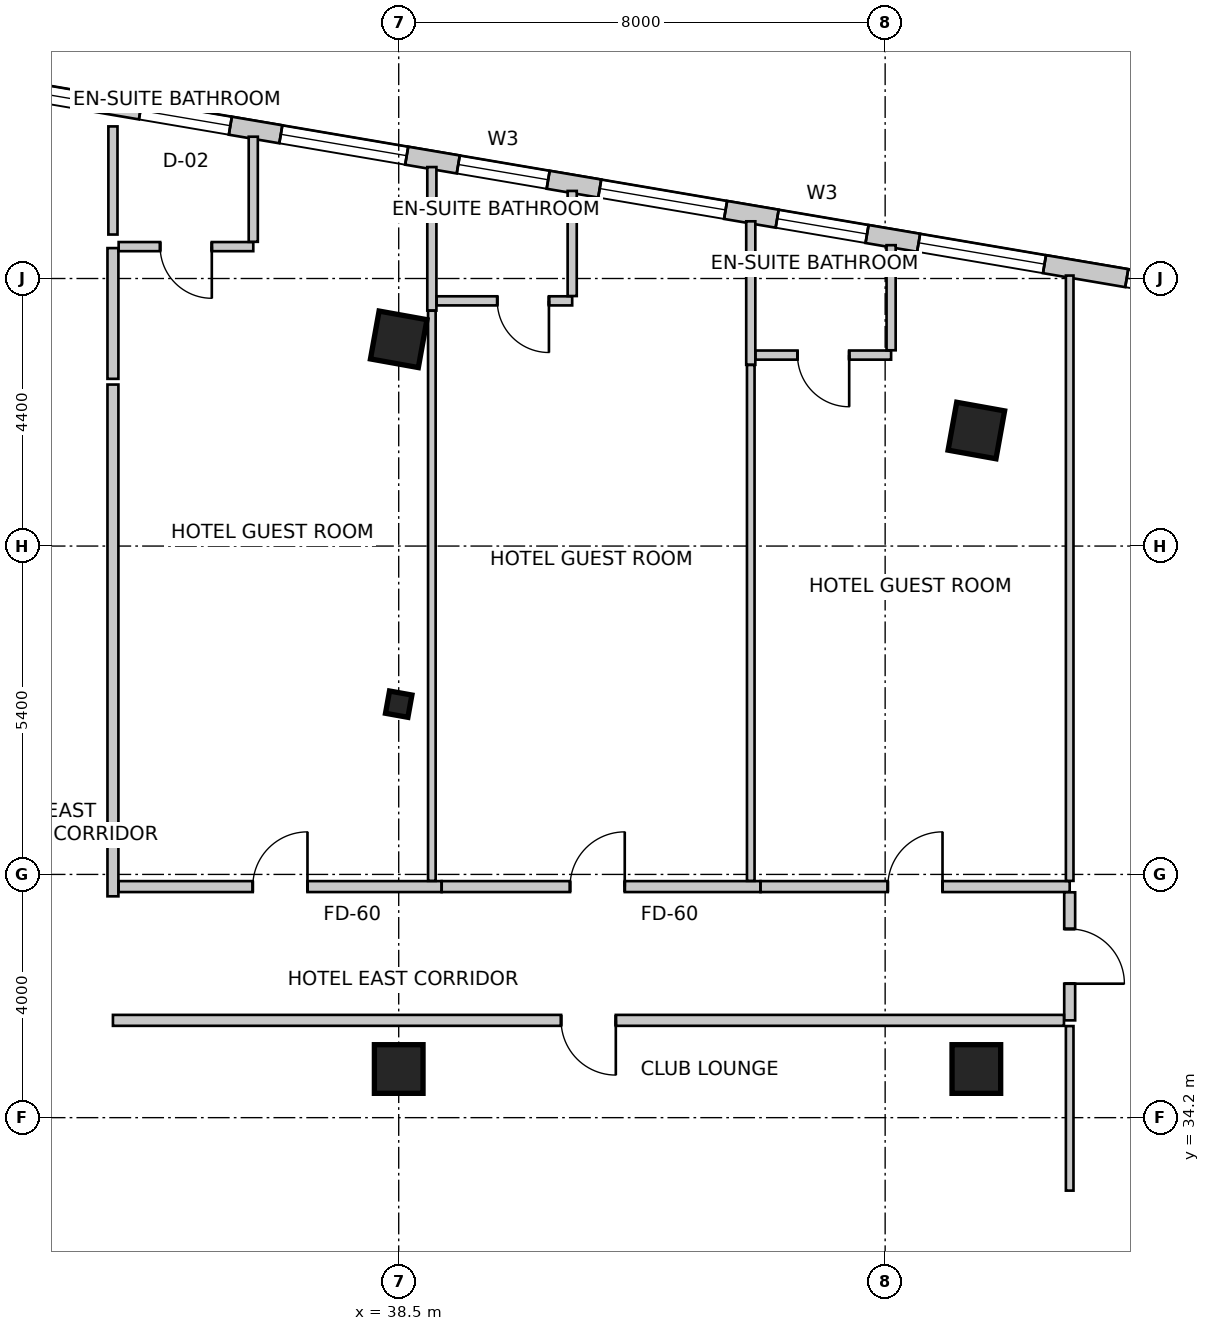
"""IFC4 building model, lengths in metres.
Left out: names, types, materials, properties, quantities, classifications, styles, units other than length and angle.
Written with IfcOpenShell. Run it as: python <this file> out.ifc"""

import sys

from ifc_helpers import new_model, si_unit, direction, frame, frame_2d, origin, origin_2d, place, context, subcontext, project, spatial, rectangle, i_section, extrude, source, transform, mapped, element, fill, save


model = new_model("IFC4")
c1 = context("Model", 3, precision=1e-05, world=origin(), true_north=direction((0.0, 1.0)))
c2 = subcontext(c1, "Body", "Model", "MODEL_VIEW")
j1 = project(units=[si_unit("LENGTHUNIT", "METRE"), si_unit("PLANEANGLEUNIT", "RADIAN")], contexts=[c1])
p1 = place(None, origin())
s1 = spatial("IfcSite", under=j1, at=p1, CompositionType="ELEMENT")
p2 = place(p1, origin())
s2 = spatial("IfcBuilding", under=s1, at=p2, CompositionType="ELEMENT")
p3 = place(p2, frame((0.0, 0.0, 114.2)))
s3 = spatial("IfcBuildingStorey", under=s2, at=p3, CompositionType="ELEMENT", Elevation=114.2)
m1 = source(origin(), c2, "Body", "SweptSolid", [
    extrude(rectangle(XDim=0.8, YDim=0.8, at=origin_2d()), origin(), (0.0, 0.0, 1.0), 3.6),
])
for number, where, z_axis, x_axis in (
    (1, (38.5, 47.0, 0.0), (0.0, 0.0, 1.0), (0.984, -0.177, 0.0)),
    (2, (48.0, 45.5, 0.0), (0.0, 0.0, 1.0), (0.984, -0.177, 0.0)),
    (3, (38.5, 35.0, 0.0), (0.0, 0.0, 1.0), (1.0, 0.0, 0.0)),
    (4, (48.0, 35.0, 0.0), (0.0, 0.0, 1.0), (1.0, 0.0, 0.0)),
):
    element("IfcColumn", number, at=place(p3, frame(where, z_axis=z_axis, x_axis=x_axis)), inside=s3, PredefinedType="COLUMN", context=c2, shape_type="MappedRepresentation", body=[
        mapped(m1, transform((0.0, 0.0, 0.0), scale=1.0)),
    ])
m2 = source(origin(), c2, "Body", "SweptSolid", [
    extrude(i_section(OverallWidth=0.374, OverallDepth=0.372, WebThickness=0.016, FlangeThickness=0.026, FilletRadius=0.015, at=origin_2d()), origin(), (0.0, 0.0, 1.0), 3.6),
])
p4 = place(p3, frame((38.5, 41.0, 0.0), z_axis=(0.0, 0.0, 1.0), x_axis=(0.984195607969, -0.17708474032, 0.0)))
e5 = element("IfcColumn", 5, at=p4, inside=s3, PredefinedType="COLUMN", context=c2, shape_type="MappedRepresentation", body=[
    mapped(m2, transform((0.0, 0.0, 0.0), scale=1.0)),
])
p5 = place(p3, frame((53.561, 47.48, 0.0), z_axis=(0.0, 0.0, 1.0), x_axis=(-0.985845173895, 0.167658262868, 0.0)))
e6 = element("IfcWall", 6, at=p5, inside=s3, PredefinedType="SOLIDWALL", context=c2, shape_type="SweptSolid", body=[
    extrude(rectangle(XDim=32.132, YDim=0.3, at=frame_2d((16.066, 0.0))), origin(), (0.0, 0.0, 1.0), 3.35),
])
m3 = source(origin(), c2, "Body", "SweptSolid", [
    extrude(rectangle(XDim=2.1, YDim=2.0, at=frame_2d((1.05, 1.0))), frame((0.0, 0.16, 0.0), z_axis=(0.0, -1.0, 0.0), x_axis=(1.0, 0.0, 0.0)), (0.0, 0.0, 1.0), 0.32),
])
p6 = place(p5, frame((1.032, 0.0, 0.85)))
e7 = element("IfcOpeningElement", 7, at=p6, cuts=e6, PredefinedType="OPENING", context=c2, shape_type="MappedRepresentation", body=[
    mapped(m3, transform((0.0, 0.0, 0.0), scale=1.0)),
])
p7 = place(p5, frame((4.504, 0.0, 0.85)))
e8 = element("IfcOpeningElement", 8, at=p7, cuts=e6, PredefinedType="OPENING", context=c2, shape_type="MappedRepresentation", body=[
    mapped(m3, transform((0.0, 0.0, 0.0), scale=1.0)),
])
m4 = source(origin(), c2, "Body", "SweptSolid", [
    extrude(rectangle(XDim=1.5, YDim=1.8, at=frame_2d((0.75, 0.9))), frame((0.0, 0.16, 0.0), z_axis=(0.0, -1.0, 0.0), x_axis=(1.0, 0.0, 0.0)), (0.0, 0.0, 1.0), 0.32),
])
p8 = place(p5, frame((7.464, 0.0, 0.85)))
e9 = element("IfcOpeningElement", 9, at=p8, cuts=e6, PredefinedType="OPENING", context=c2, shape_type="MappedRepresentation", body=[
    mapped(m4, transform((0.0, 0.0, 0.0), scale=1.0)),
])
p9 = place(p5, frame((9.824, 0.0, 0.85)))
e10 = element("IfcOpeningElement", 10, at=p9, cuts=e6, PredefinedType="OPENING", context=c2, shape_type="MappedRepresentation", body=[
    mapped(m3, transform((0.0, 0.0, 0.0), scale=1.0)),
])
p10 = place(p5, frame((12.784, 0.0, 0.85)))
e11 = element("IfcOpeningElement", 11, at=p10, cuts=e6, PredefinedType="OPENING", context=c2, shape_type="MappedRepresentation", body=[
    mapped(m4, transform((0.0, 0.0, 0.0), scale=1.0)),
])
p11 = place(p5, frame((15.144, 0.0, 0.85)))
e12 = element("IfcOpeningElement", 12, at=p11, cuts=e6, PredefinedType="OPENING", context=c2, shape_type="MappedRepresentation", body=[
    mapped(m3, transform((0.0, 0.0, 0.0), scale=1.0)),
])
p12 = place(p5, frame((18.086, 0.0, 0.85)))
e13 = element("IfcOpeningElement", 13, at=p12, cuts=e6, PredefinedType="OPENING", context=c2, shape_type="MappedRepresentation", body=[
    mapped(m4, transform((0.0, 0.0, 0.0), scale=1.0)),
])
p13 = place(p5, frame((20.459, 0.0, 0.85)))
e14 = element("IfcOpeningElement", 14, at=p13, cuts=e6, PredefinedType="OPENING", context=c2, shape_type="MappedRepresentation", body=[
    mapped(m3, transform((0.0, 0.0, 0.0), scale=1.0)),
])
p14 = place(p5, frame((25.55, 0.0, 0.85)))
e15 = element("IfcOpeningElement", 15, at=p14, cuts=e6, PredefinedType="OPENING", context=c2, shape_type="MappedRepresentation", body=[
    mapped(m3, transform((0.0, 0.0, 0.0), scale=1.0)),
])
m5 = source(origin(), c2, "Body", "SweptSolid", [
    extrude(rectangle(XDim=0.9, YDim=1.6, at=frame_2d((0.45, 0.8))), frame((0.0, 0.16, 0.0), z_axis=(0.0, -1.0, 0.0), x_axis=(1.0, 0.0, 0.0)), (0.0, 0.0, 1.0), 0.32),
])
p15 = place(p5, frame((30.65, 0.0, 0.85)))
e16 = element("IfcOpeningElement", 16, at=p15, cuts=e6, PredefinedType="OPENING", context=c2, shape_type="MappedRepresentation", body=[
    mapped(m5, transform((0.0, 0.0, 0.0), scale=1.0)),
])
p16 = place(p3, frame((33.8, 48.5, 0.0), z_axis=(0.0, 0.0, 1.0), x_axis=(0.0, -1.0, 0.0)))
e17 = element("IfcWall", 17, at=p16, inside=s3, PredefinedType="PARTITIONING", context=c2, shape_type="SweptSolid", body=[
    extrude(rectangle(XDim=2.15, YDim=0.18, at=frame_2d((1.075, 0.0))), origin(), (0.0, 0.0, 1.0), 2.492),
])
p17 = place(p3, frame((33.8, 46.256, 0.0), z_axis=(0.0, 0.0, 1.0), x_axis=(0.0, -1.0, 0.0)))
e18 = element("IfcWall", 18, at=p17, inside=s3, PredefinedType="PARTITIONING", context=c2, shape_type="SweptSolid", body=[
    extrude(rectangle(XDim=8.416, YDim=0.18, at=frame_2d((4.208, 0.0))), origin(), (0.0, 0.0, 1.0), 2.788),
])
p18 = place(p3, frame((33.894, 38.0, 0.0), z_axis=(0.0, 0.0, 1.0), x_axis=(1.0, 0.0, 0.0)))
e19 = element("IfcWall", 19, at=p18, inside=s3, PredefinedType="PARTITIONING", context=c2, shape_type="SweptSolid", body=[
    extrude(rectangle(XDim=5.311, YDim=0.18, at=frame_2d((2.656, 0.0))), origin(), (0.0, 0.0, 1.0), 2.803),
])
m6 = source(origin(), c2, "Body", "SweptSolid", [
    extrude(rectangle(XDim=0.9, YDim=2.15, at=frame_2d((0.45, 1.075))), frame((0.0, 0.1, 0.0), z_axis=(0.0, -1.0, 0.0), x_axis=(1.0, 0.0, 0.0)), (0.0, 0.0, 1.0), 0.2),
])
p19 = place(p18, frame((2.206, 0.0, 0.0)))
e20 = element("IfcOpeningElement", 20, at=p19, cuts=e19, PredefinedType="OPENING", context=c2, shape_type="MappedRepresentation", body=[
    mapped(m6, transform((0.0, 0.0, 0.0), scale=1.0)),
])
p20 = place(p3, frame((39.207, 38.0, 0.0), z_axis=(0.0, 0.0, 1.0), x_axis=(1.0, 0.0, 0.0)))
e21 = element("IfcWall", 21, at=p20, inside=s3, PredefinedType="PARTITIONING", context=c2, shape_type="SweptSolid", body=[
    extrude(rectangle(XDim=5.243, YDim=0.18, at=frame_2d((2.622, 0.0))), origin(), (0.0, 0.0, 1.0), 2.788),
])
p21 = place(p20, frame((2.111, 0.0, 0.0)))
e22 = element("IfcOpeningElement", 22, at=p21, cuts=e21, PredefinedType="OPENING", context=c2, shape_type="MappedRepresentation", body=[
    mapped(m6, transform((0.0, 0.0, 0.0), scale=1.0)),
])
p22 = place(p3, frame((44.452, 38.0, 0.0), z_axis=(0.0, 0.0, 1.0), x_axis=(1.0, 0.0, 0.0)))
e23 = element("IfcWall", 23, at=p22, inside=s3, PredefinedType="PARTITIONING", context=c2, shape_type="SweptSolid", body=[
    extrude(rectangle(XDim=5.083, YDim=0.18, at=frame_2d((2.542, 0.0))), origin(), (0.0, 0.0, 1.0), 2.803),
])
p23 = place(p22, frame((2.092, 0.0, 0.0)))
e24 = element("IfcOpeningElement", 24, at=p23, cuts=e23, PredefinedType="OPENING", context=c2, shape_type="MappedRepresentation", body=[
    mapped(m6, transform((0.0, 0.0, 0.0), scale=1.0)),
])
p24 = place(p3, frame((49.535, 37.906, 0.0), z_axis=(0.0, 0.0, 1.0), x_axis=(0.0, -1.0, 0.0)))
e25 = element("IfcWall", 25, at=p24, inside=s3, PredefinedType="PARTITIONING", context=c2, shape_type="SweptSolid", body=[
    extrude(rectangle(XDim=2.106, YDim=0.18, at=frame_2d((1.053, 0.0))), origin(), (0.0, 0.0, 1.0), 3.35),
])
p25 = place(p24, frame((0.603, 0.0, 0.0)))
e26 = element("IfcOpeningElement", 26, at=p25, cuts=e25, PredefinedType="OPENING", context=c2, shape_type="MappedRepresentation", body=[
    mapped(m6, transform((0.0, 0.0, 0.0), scale=1.0)),
])
p26 = place(p3, frame((49.441, 35.8, 0.0), z_axis=(0.0, 0.0, 1.0), x_axis=(-1.0, 0.0, 0.0)))
e27 = element("IfcWall", 27, at=p26, inside=s3, PredefinedType="PARTITIONING", context=c2, shape_type="SweptSolid", body=[
    extrude(rectangle(XDim=15.641, YDim=0.18, at=frame_2d((7.82, 0.0))), origin(), (0.0, 0.0, 1.0), 2.788),
])
p27 = place(p26, frame((7.371, 0.0, 0.0)))
e28 = element("IfcOpeningElement", 28, at=p27, cuts=e27, PredefinedType="OPENING", context=c2, shape_type="MappedRepresentation", body=[
    mapped(m6, transform((0.0, 0.0, 0.0), scale=1.0)),
])
p28 = place(p3, frame((36.108, 48.524, 0.0), z_axis=(0.0, 0.0, 1.0), x_axis=(-1.0, 0.0, 0.0)))
e29 = element("IfcWall", 29, at=p28, inside=s3, PredefinedType="PARTITIONING", context=c2, shape_type="SweptSolid", body=[
    extrude(rectangle(XDim=2.214, YDim=0.15, at=frame_2d((1.107, 0.0))), origin(), (0.0, 0.0, 1.0), 3.35),
])
m7 = source(origin(), c2, "Body", "SweptSolid", [
    extrude(rectangle(XDim=0.85, YDim=2.15, at=frame_2d((0.425, 1.075))), frame((0.0, 0.085, 0.0), z_axis=(0.0, -1.0, 0.0), x_axis=(1.0, 0.0, 0.0)), (0.0, 0.0, 1.0), 0.17),
])
p29 = place(p28, frame((0.682, 0.0, 0.0)))
e30 = element("IfcOpeningElement", 30, at=p29, cuts=e29, PredefinedType="OPENING", context=c2, shape_type="MappedRepresentation", body=[
    mapped(m7, transform((0.0, 0.0, 0.0), scale=1.0)),
])
p30 = place(p3, frame((36.108, 50.332, 0.0), z_axis=(0.0, 0.0, 1.0), x_axis=(0.0, -1.0, 0.0)))
e31 = element("IfcWall", 31, at=p30, inside=s3, PredefinedType="PARTITIONING", context=c2, shape_type="SweptSolid", body=[
    extrude(rectangle(XDim=1.728, YDim=0.15, at=frame_2d((0.864, 0.0))), origin(), (0.0, 0.0, 1.0), 3.35),
])
p31 = place(p3, frame((39.045, 49.833, 0.0), z_axis=(0.0, 0.0, 1.0), x_axis=(0.0, -1.0, 0.0)))
e32 = element("IfcWall", 32, at=p31, inside=s3, PredefinedType="PARTITIONING", context=c2, shape_type="SweptSolid", body=[
    extrude(rectangle(XDim=2.36, YDim=0.15, at=frame_2d((1.18, 0.0))), origin(), (0.0, 0.0, 1.0), 3.35),
])
p32 = place(p3, frame((39.045, 47.47, 0.0), z_axis=(0.0, 0.0, 1.0), x_axis=(0.0, -1.0, 0.0)))
e33 = element("IfcWall", 33, at=p32, inside=s3, PredefinedType="PARTITIONING", context=c2, shape_type="SweptSolid", body=[
    extrude(rectangle(XDim=9.376, YDim=0.125, at=frame_2d((4.688, 0.0))), origin(), (0.0, 0.0, 1.0), 2.492),
])
p33 = place(p3, frame((41.353, 47.633, 0.0), z_axis=(0.0, 0.0, 1.0), x_axis=(-1.0, 0.0, 0.0)))
e34 = element("IfcWall", 34, at=p33, inside=s3, PredefinedType="PARTITIONING", context=c2, shape_type="SweptSolid", body=[
    extrude(rectangle(XDim=2.229, YDim=0.15, at=frame_2d((1.115, 0.0))), origin(), (0.0, 0.0, 1.0), 3.35),
])
p34 = place(p33, frame((0.382, 0.0, 0.0)))
e35 = element("IfcOpeningElement", 35, at=p34, cuts=e34, PredefinedType="OPENING", context=c2, shape_type="MappedRepresentation", body=[
    mapped(m7, transform((0.0, 0.0, 0.0), scale=1.0)),
])
p35 = place(p3, frame((41.353, 49.44, 0.0), z_axis=(0.0, 0.0, 1.0), x_axis=(0.0, -1.0, 0.0)))
e36 = element("IfcWall", 36, at=p35, inside=s3, PredefinedType="PARTITIONING", context=c2, shape_type="SweptSolid", body=[
    extrude(rectangle(XDim=1.729, YDim=0.15, at=frame_2d((0.864, 0.0))), origin(), (0.0, 0.0, 1.0), 3.35),
])
p36 = place(p3, frame((44.29, 48.94, 0.0), z_axis=(0.0, 0.0, 1.0), x_axis=(0.0, -1.0, 0.0)))
e37 = element("IfcWall", 37, at=p36, inside=s3, PredefinedType="PARTITIONING", context=c2, shape_type="SweptSolid", body=[
    extrude(rectangle(XDim=2.36, YDim=0.15, at=frame_2d((1.18, 0.0))), origin(), (0.0, 0.0, 1.0), 3.35),
])
p37 = place(p3, frame((44.29, 46.579, 0.0), z_axis=(0.0, 0.0, 1.0), x_axis=(0.0, -1.0, 0.0)))
e38 = element("IfcWall", 38, at=p37, inside=s3, PredefinedType="PARTITIONING", context=c2, shape_type="SweptSolid", body=[
    extrude(rectangle(XDim=8.485, YDim=0.125, at=frame_2d((4.242, 0.0))), origin(), (0.0, 0.0, 1.0), 2.492),
])
p38 = place(p3, frame((46.598, 46.74, 0.0), z_axis=(0.0, 0.0, 1.0), x_axis=(-1.0, 0.0, 0.0)))
e39 = element("IfcWall", 39, at=p38, inside=s3, PredefinedType="PARTITIONING", context=c2, shape_type="SweptSolid", body=[
    extrude(rectangle(XDim=2.229, YDim=0.15, at=frame_2d((1.115, 0.0))), origin(), (0.0, 0.0, 1.0), 3.35),
])
p39 = place(p38, frame((0.689, 0.0, 0.0)))
e40 = element("IfcOpeningElement", 40, at=p39, cuts=e39, PredefinedType="OPENING", context=c2, shape_type="MappedRepresentation", body=[
    mapped(m7, transform((0.0, 0.0, 0.0), scale=1.0)),
])
p40 = place(p3, frame((46.598, 48.548, 0.0), z_axis=(0.0, 0.0, 1.0), x_axis=(0.0, -1.0, 0.0)))
e41 = element("IfcWall", 41, at=p40, inside=s3, PredefinedType="PARTITIONING", context=c2, shape_type="SweptSolid", body=[
    extrude(rectangle(XDim=1.729, YDim=0.15, at=frame_2d((0.864, 0.0))), origin(), (0.0, 0.0, 1.0), 3.35),
])
p41 = place(p3, frame((49.535, 48.049, 0.0), z_axis=(0.0, 0.0, 1.0), x_axis=(0.0, -1.0, 0.0)))
e42 = element("IfcWall", 42, at=p41, inside=s3, PredefinedType="PARTITIONING", context=c2, shape_type="SweptSolid", body=[
    extrude(rectangle(XDim=9.955, YDim=0.125, at=frame_2d((4.977, 0.0))), origin(), (0.0, 0.0, 1.0), 3.35),
])
p42 = place(p3, frame((49.535, 33.0, 0.0), z_axis=(0.0, 0.0, 1.0), x_axis=(0.0, 1.0, 0.0)))
e43 = element("IfcWall", 43, at=p42, inside=s3, PredefinedType="PARTITIONING", context=c2, shape_type="SweptSolid", body=[
    extrude(rectangle(XDim=2.706, YDim=0.125, at=frame_2d((1.353, 0.0))), origin(), (0.0, 0.0, 1.0), 3.35),
])
p43 = place(p3, frame((33.8, 48.723, 0.0), z_axis=(0.0, 0.0, 1.0), x_axis=(0.0, 1.0, 0.0)))
e44 = element("IfcWall", 44, at=p43, inside=s3, PredefinedType="PARTITIONING", context=c2, shape_type="SweptSolid", body=[
    extrude(rectangle(XDim=1.778, YDim=0.15, at=frame_2d((0.889, 0.0))), origin(), (0.0, 0.0, 1.0), 3.35),
])
m8 = source(origin(), c2, "Body", "SweptSolid", [
    extrude(rectangle(XDim=2.1, YDim=2.0, at=frame_2d((1.05, 1.0))), frame((0.0, -0.015, 0.0), z_axis=(0.0, -1.0, 0.0), x_axis=(1.0, 0.0, 0.0)), (0.0, 0.0, 1.0), 0.06),
])
p44 = place(p6, origin())
e45 = element("IfcWindow", 45, at=p44, inside=s3, PartitioningType="SINGLE_PANEL", PredefinedType="WINDOW", context=c2, shape_type="MappedRepresentation", body=[
    mapped(m8, transform((0.0, 0.0, 0.0), scale=1.0)),
])
fill(e7, e45)
p45 = place(p7, origin())
e46 = element("IfcWindow", 46, at=p45, inside=s3, PartitioningType="SINGLE_PANEL", PredefinedType="WINDOW", context=c2, shape_type="MappedRepresentation", body=[
    mapped(m8, transform((0.0, 0.0, 0.0), scale=1.0)),
])
fill(e8, e46)
m9 = source(origin(), c2, "Body", "SweptSolid", [
    extrude(rectangle(XDim=1.5, YDim=1.8, at=frame_2d((0.75, 0.9))), frame((0.0, -0.015, 0.0), z_axis=(0.0, -1.0, 0.0), x_axis=(1.0, 0.0, 0.0)), (0.0, 0.0, 1.0), 0.06),
])
p46 = place(p8, origin())
e47 = element("IfcWindow", 47, at=p46, inside=s3, PartitioningType="SINGLE_PANEL", PredefinedType="WINDOW", context=c2, shape_type="MappedRepresentation", body=[
    mapped(m9, transform((0.0, 0.0, 0.0), scale=1.0)),
])
fill(e9, e47)
p47 = place(p9, origin())
e48 = element("IfcWindow", 48, at=p47, inside=s3, PartitioningType="SINGLE_PANEL", PredefinedType="WINDOW", context=c2, shape_type="MappedRepresentation", body=[
    mapped(m8, transform((0.0, 0.0, 0.0), scale=1.0)),
])
fill(e10, e48)
p48 = place(p10, origin())
e49 = element("IfcWindow", 49, at=p48, inside=s3, PartitioningType="SINGLE_PANEL", PredefinedType="WINDOW", context=c2, shape_type="MappedRepresentation", body=[
    mapped(m9, transform((0.0, 0.0, 0.0), scale=1.0)),
])
fill(e11, e49)
p49 = place(p11, origin())
e50 = element("IfcWindow", 50, at=p49, inside=s3, PartitioningType="SINGLE_PANEL", PredefinedType="WINDOW", context=c2, shape_type="MappedRepresentation", body=[
    mapped(m8, transform((0.0, 0.0, 0.0), scale=1.0)),
])
fill(e12, e50)
p50 = place(p12, origin())
e51 = element("IfcWindow", 51, at=p50, inside=s3, PartitioningType="SINGLE_PANEL", PredefinedType="WINDOW", context=c2, shape_type="MappedRepresentation", body=[
    mapped(m9, transform((0.0, 0.0, 0.0), scale=1.0)),
])
fill(e13, e51)
p51 = place(p13, origin())
e52 = element("IfcWindow", 52, at=p51, inside=s3, PartitioningType="SINGLE_PANEL", PredefinedType="WINDOW", context=c2, shape_type="MappedRepresentation", body=[
    mapped(m8, transform((0.0, 0.0, 0.0), scale=1.0)),
])
fill(e14, e52)
m10 = source(origin(), c2, "Body", "SweptSolid", [
    extrude(rectangle(XDim=0.85, YDim=2.15, at=frame_2d((0.425, 1.075))), frame((0.0, 0.025, 0.0), z_axis=(0.0, -1.0, 0.0), x_axis=(1.0, 0.0, 0.0)), (0.0, 0.0, 1.0), 0.05),
])
p52 = place(p29, origin())
e53 = element("IfcDoor", 53, at=p52, inside=s3, OperationType="SINGLE_SWING_LEFT", PredefinedType="DOOR", context=c2, shape_type="MappedRepresentation", body=[
    mapped(m10, transform((0.0, 0.0, 0.0), scale=1.0)),
])
fill(e30, e53)
m11 = source(origin(), c2, "Body", "SweptSolid", [
    extrude(rectangle(XDim=0.9, YDim=2.15, at=frame_2d((0.45, 1.075))), frame((0.0, 0.025, 0.0), z_axis=(0.0, -1.0, 0.0), x_axis=(1.0, 0.0, 0.0)), (0.0, 0.0, 1.0), 0.05),
])
p53 = place(p19, origin())
e54 = element("IfcDoor", 54, at=p53, inside=s3, OperationType="SINGLE_SWING_RIGHT", PredefinedType="DOOR", context=c2, shape_type="MappedRepresentation", body=[
    mapped(m11, transform((0.0, 0.0, 0.0), scale=1.0)),
])
fill(e20, e54)
p54 = place(p34, origin())
e55 = element("IfcDoor", 55, at=p54, inside=s3, OperationType="SINGLE_SWING_LEFT", PredefinedType="DOOR", context=c2, shape_type="MappedRepresentation", body=[
    mapped(m10, transform((0.0, 0.0, 0.0), scale=1.0)),
])
fill(e35, e55)
p55 = place(p21, origin())
e56 = element("IfcDoor", 56, at=p55, inside=s3, OperationType="SINGLE_SWING_RIGHT", PredefinedType="DOOR", context=c2, shape_type="MappedRepresentation", body=[
    mapped(m11, transform((0.0, 0.0, 0.0), scale=1.0)),
])
fill(e22, e56)
p56 = place(p39, origin())
e57 = element("IfcDoor", 57, at=p56, inside=s3, OperationType="SINGLE_SWING_LEFT", PredefinedType="DOOR", context=c2, shape_type="MappedRepresentation", body=[
    mapped(m10, transform((0.0, 0.0, 0.0), scale=1.0)),
])
fill(e40, e57)
p57 = place(p23, origin())
e58 = element("IfcDoor", 58, at=p57, inside=s3, OperationType="SINGLE_SWING_RIGHT", PredefinedType="DOOR", context=c2, shape_type="MappedRepresentation", body=[
    mapped(m11, transform((0.0, 0.0, 0.0), scale=1.0)),
])
fill(e24, e58)
p58 = place(p25, origin())
e59 = element("IfcDoor", 59, at=p58, inside=s3, OperationType="SINGLE_SWING_RIGHT", PredefinedType="DOOR", context=c2, shape_type="MappedRepresentation", body=[
    mapped(m11, transform((0.0, 0.0, 0.0), scale=1.0)),
])
fill(e26, e59)
m12 = source(origin(), c2, "Body", "SweptSolid", [
    extrude(rectangle(XDim=0.9, YDim=2.15, at=frame_2d((0.45, 1.075))), frame((0.0, 0.025, 0.0), z_axis=(0.0, -1.0, 0.0), x_axis=(1.0, 0.0, 0.0)), (0.0, 0.0, 1.0), 0.05),
])
p59 = place(p27, origin())
e60 = element("IfcDoor", 60, at=p59, inside=s3, OperationType="SINGLE_SWING_LEFT", PredefinedType="DOOR", context=c2, shape_type="MappedRepresentation", body=[
    mapped(m12, transform((0.0, 0.0, 0.0), scale=1.0)),
])
fill(e28, e60)
save(model, sys.argv[1])
